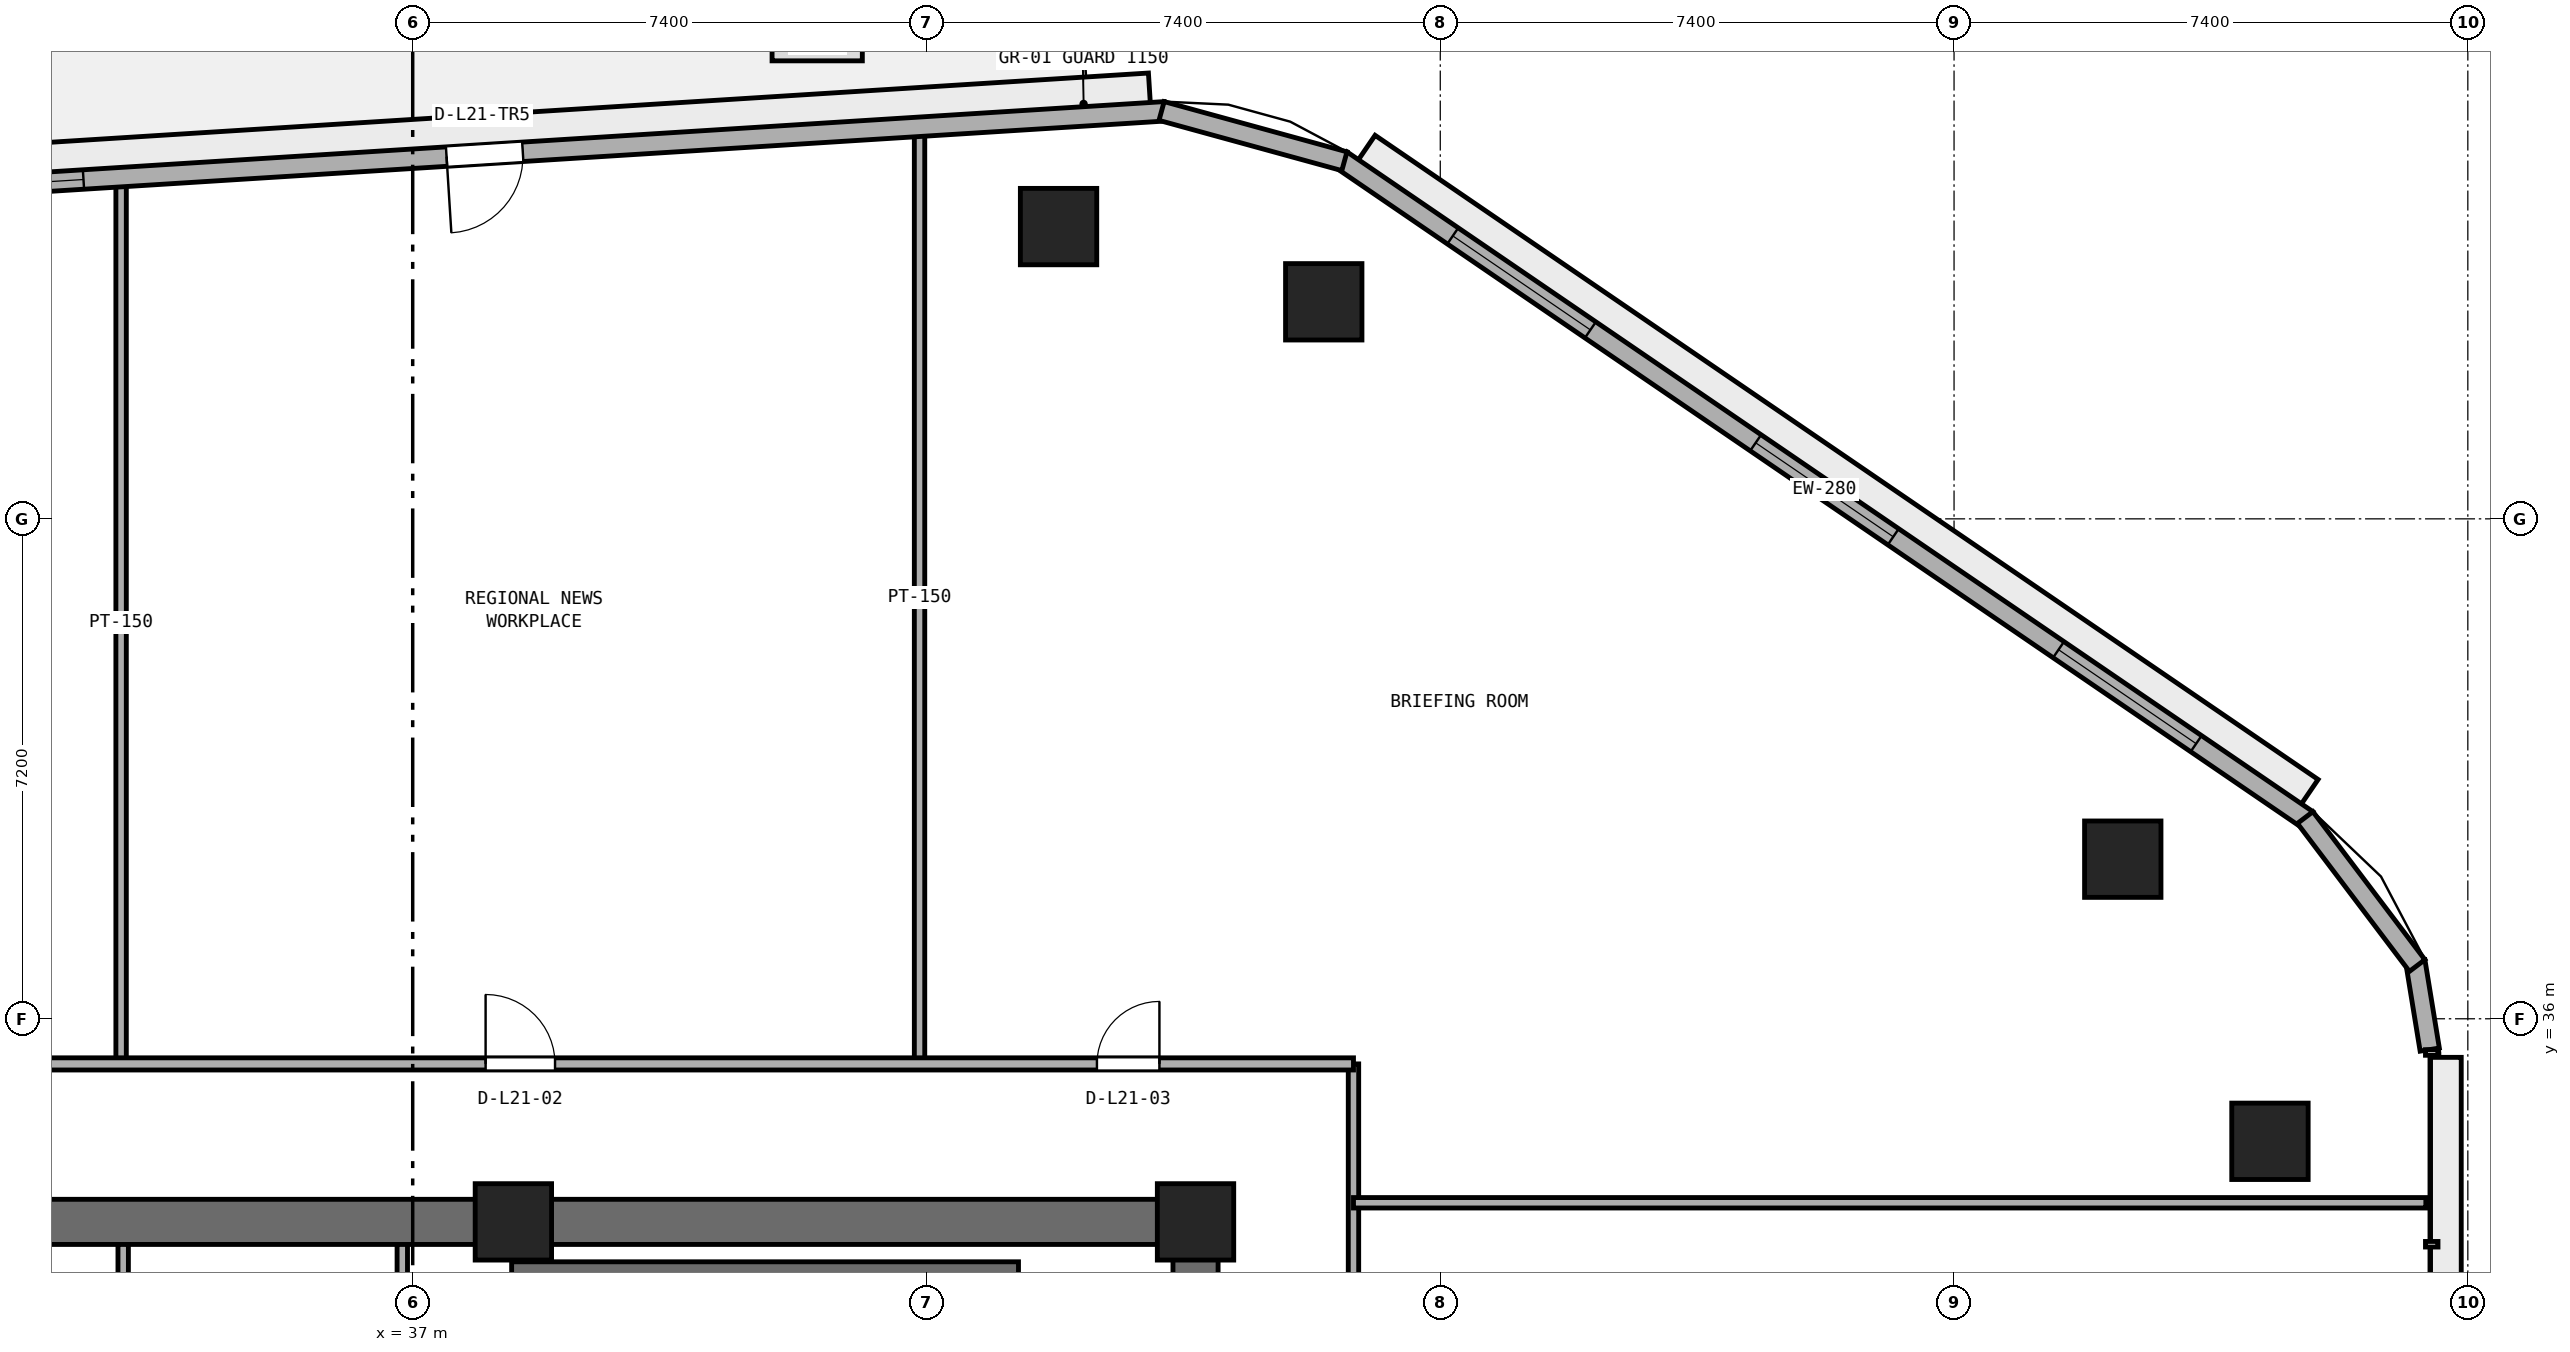
"""IFC4 building model, lengths in metres.
Left out: names, types, materials, properties, quantities, classifications, styles, units other than length and angle.
Written with IfcOpenShell. Run it as: python <this file> out.ifc"""

import sys

from ifc_helpers import new_model, si_unit, direction, frame, frame_2d, origin, origin_2d, place, context, subcontext, project, spatial, rectangle, extrude, element, fill, save


model = new_model("IFC4")
c1 = context("Model", 3, precision=1e-05, world=origin(), true_north=direction((0.0, 1.0)))
c2 = subcontext(c1, "Body", "Model", "MODEL_VIEW")
j1 = project(units=[si_unit("LENGTHUNIT", "METRE"), si_unit("PLANEANGLEUNIT", "RADIAN")], contexts=[c1])
p1 = place(None, origin())
s1 = spatial("IfcSite", under=j1, at=p1, CompositionType="ELEMENT")
p2 = place(p1, origin())
s2 = spatial("IfcBuilding", under=s1, at=p2, CompositionType="ELEMENT")
p3 = place(p2, frame((0.0, 0.0, 85.8)))
s3 = spatial("IfcBuildingStorey", under=s2, at=p3, CompositionType="ELEMENT", Elevation=85.8)
p4 = place(p3, frame((25.4, 33.075, 0.0), z_axis=(0.0, 0.0, 1.0), x_axis=(1.0, 0.0, 0.0)))
e1 = element("IfcWall", 1, at=p4, inside=s3, PredefinedType="SHEAR", context=c2, shape_type="SweptSolid", body=[
    extrude(rectangle(XDim=23.2, YDim=0.65, at=frame_2d((11.6, 0.0))), origin(), (0.0, 0.0, 1.0), 3.525),
])
p5 = place(p3, frame((48.275, 17.65, 0.0), z_axis=(0.0, 0.0, 1.0), x_axis=(0.0, 1.0, 0.0)))
e2 = element("IfcWall", 2, at=p5, inside=s3, PredefinedType="SHEAR", context=c2, shape_type="SweptSolid", body=[
    extrude(rectangle(XDim=15.1, YDim=0.65, at=frame_2d((7.55, 0.0))), origin(), (0.0, 0.0, 1.0), 3.525),
])
p6 = place(p5, frame((5.65, 0.0, 0.0)))
e3 = element("IfcOpeningElement", 3, at=p6, cuts=e2, PredefinedType="OPENING", context=c2, shape_type="SweptSolid", body=[
    extrude(rectangle(XDim=1.5, YDim=2.15, at=frame_2d((0.75, 1.075))), frame((0.0, 0.335, 0.0), z_axis=(0.0, -1.0, 0.0), x_axis=(1.0, 0.0, 0.0)), (0.0, 0.0, 1.0), 0.67),
])
for number, where, z_axis, x_axis in (
    (4, (48.275, 33.075, 0.0), (0.0, 0.0, 1.0), (1.0, 0.0, 0.0)),
    (5, (38.45, 33.075, 0.0), (0.0, 0.0, 1.0), (1.0, 0.0, 0.0)),
):
    element("IfcColumn", number, at=place(p3, frame(where, z_axis=z_axis, x_axis=x_axis)), inside=s3, PredefinedType="PILASTER", context=c2, shape_type="SweptSolid", body=[
        extrude(rectangle(XDim=1.1, YDim=1.1, at=origin_2d()), origin(), (0.0, 0.0, 1.0), 3.8),
    ])
for number, where, z_axis, x_axis in (
    (6, (63.75, 34.235, 0.0), (0.0, 0.0, 1.0), (1.0, 0.0, 0.0)),
    (7, (61.63, 38.299, 0.0), (0.0, 0.0, 1.0), (1.0, 0.0, 0.0)),
    (8, (50.122, 46.326, 0.0), (0.0, 0.0, 1.0), (1.0, 0.0, 0.0)),
    (9, (46.302, 47.409, 0.0), (0.0, 0.0, 1.0), (1.0, 0.0, 0.0)),
):
    element("IfcColumn", number, at=place(p3, frame(where, z_axis=z_axis, x_axis=x_axis)), inside=s3, PredefinedType="COLUMN", context=c2, shape_type="SweptSolid", body=[
        extrude(rectangle(XDim=1.1, YDim=1.1, at=origin_2d()), origin(), (0.0, 0.0, 1.0), 3.8),
    ])
p7 = place(p3, frame((38.425, 32.375, 0.0), z_axis=(0.0, 0.0, 1.0), x_axis=(1.0, 0.0, 0.0)))
e10 = element("IfcWall", 10, at=p7, inside=s3, PredefinedType="SHEAR", context=c2, shape_type="SweptSolid", body=[
    extrude(rectangle(XDim=7.3, YDim=0.25, at=frame_2d((3.65, 0.0))), origin(), (0.0, 0.0, 1.0), 3.525),
])
for number, where, z_axis, x_axis in (
    (11, (32.83, 30.65, 0.0), (0.0, 0.0, 1.0), (0.0, 1.0, 0.0)),
    (12, (36.85, 30.65, 0.0), (0.0, 0.0, 1.0), (0.0, 1.0, 0.0)),
):
    element("IfcWall", number, at=place(p3, frame(where, z_axis=z_axis, x_axis=x_axis)), inside=s3, PredefinedType="PARTITIONING", context=c2, shape_type="SweptSolid", body=[
        extrude(rectangle(XDim=2.1, YDim=0.15, at=frame_2d((1.05, 0.0))), origin(), (0.0, 0.0, 1.0), 3.525),
    ])
p8 = place(p3, frame((50.55, 15.05, 0.0), z_axis=(0.0, 0.0, 1.0), x_axis=(0.0, 1.0, 0.0)))
e13 = element("IfcWall", 13, at=p8, inside=s3, PredefinedType="PARTITIONING", context=c2, shape_type="SweptSolid", body=[
    extrude(rectangle(XDim=20.3, YDim=0.15, at=frame_2d((10.15, 0.0))), origin(), (0.0, 0.0, 1.0), 3.525),
])
p9 = place(p8, frame((9.7, 0.0, 0.0)))
e14 = element("IfcOpeningElement", 14, at=p9, cuts=e13, PredefinedType="OPENING", context=c2, shape_type="SweptSolid", body=[
    extrude(rectangle(XDim=0.9, YDim=2.1, at=frame_2d((0.45, 1.05))), frame((0.0, 0.085, 0.0), z_axis=(0.0, -1.0, 0.0), x_axis=(1.0, 0.0, 0.0)), (0.0, 0.0, 1.0), 0.17),
])
p10 = place(p3, frame((44.3, 35.35, 0.0), z_axis=(0.0, 0.0, 1.0), x_axis=(0.0, 1.0, 0.0)))
e15 = element("IfcWall", 15, at=p10, inside=s3, PredefinedType="PARTITIONING", context=c2, shape_type="SweptSolid", body=[
    extrude(rectangle(XDim=13.432, YDim=0.15, at=frame_2d((6.716, 0.0))), origin(), (0.0, 0.0, 1.0), 3.525),
])
p11 = place(p3, frame((32.8, 35.35, 0.0), z_axis=(0.0, 0.0, 1.0), x_axis=(0.0, 1.0, 0.0)))
e16 = element("IfcWall", 16, at=p11, inside=s3, PredefinedType="PARTITIONING", context=c2, shape_type="SweptSolid", body=[
    extrude(rectangle(XDim=12.707, YDim=0.15, at=frame_2d((6.353, 0.0))), origin(), (0.0, 0.0, 1.0), 3.525),
])
p12 = place(p3, frame((50.55, 33.35, 0.0), z_axis=(0.0, 0.0, 1.0), x_axis=(1.0, 0.0, 0.0)))
e17 = element("IfcWall", 17, at=p12, inside=s3, PredefinedType="PARTITIONING", context=c2, shape_type="SweptSolid", body=[
    extrude(rectangle(XDim=15.445, YDim=0.15, at=frame_2d((7.723, 0.0))), origin(), (0.0, 0.0, 1.0), 2.908),
])
p13 = place(p3, frame((23.45, 35.35, 0.0), z_axis=(0.0, 0.0, 1.0), x_axis=(1.0, 0.0, 0.0)))
e18 = element("IfcWall", 18, at=p13, inside=s3, PredefinedType="PARTITIONING", context=c2, shape_type="SweptSolid", body=[
    extrude(rectangle(XDim=27.1, YDim=0.175, at=frame_2d((13.55, 0.0))), origin(), (0.0, 0.0, 1.0), 3.525),
])
p14 = place(p13, frame((4.295, 0.0, 0.0)))
e19 = element("IfcOpeningElement", 19, at=p14, cuts=e18, PredefinedType="OPENING", context=c2, shape_type="SweptSolid", body=[
    extrude(rectangle(XDim=1.0, YDim=2.12, at=frame_2d((0.5, 1.06))), frame((0.0, 0.097, 0.0), z_axis=(0.0, -1.0, 0.0), x_axis=(1.0, 0.0, 0.0)), (0.0, 0.0, 1.0), 0.195),
])
p15 = place(p13, frame((14.6, 0.0, 0.0)))
e20 = element("IfcOpeningElement", 20, at=p15, cuts=e18, PredefinedType="OPENING", context=c2, shape_type="SweptSolid", body=[
    extrude(rectangle(XDim=1.0, YDim=2.12, at=frame_2d((0.5, 1.06))), frame((0.0, 0.097, 0.0), z_axis=(0.0, -1.0, 0.0), x_axis=(1.0, 0.0, 0.0)), (0.0, 0.0, 1.0), 0.195),
])
p16 = place(p13, frame((23.405, 0.0, 0.0)))
e21 = element("IfcOpeningElement", 21, at=p16, cuts=e18, PredefinedType="OPENING", context=c2, shape_type="SweptSolid", body=[
    extrude(rectangle(XDim=0.9, YDim=2.1, at=frame_2d((0.45, 1.05))), frame((0.0, 0.097, 0.0), z_axis=(0.0, -1.0, 0.0), x_axis=(1.0, 0.0, 0.0)), (0.0, 0.0, 1.0), 0.195),
])
p17 = place(p3, frame((64.29, 38.867, 0.0), z_axis=(0.0, 0.0, 1.0), x_axis=(-0.825755550159, 0.564028165416, 0.0)))
e22 = element("IfcWall", 22, at=p17, inside=s3, PredefinedType="STANDARD", context=c2, shape_type="SweptSolid", body=[
    extrude(rectangle(XDim=16.848, YDim=0.28, at=frame_2d((8.424, 0.0))), origin(), (0.0, 0.0, 1.0), 3.525),
])
p18 = place(p17, frame((1.941, 0.0, 0.9)))
e23 = element("IfcOpeningElement", 23, at=p18, cuts=e22, PredefinedType="OPENING", context=c2, shape_type="SweptSolid", body=[
    extrude(rectangle(XDim=2.4, YDim=1.75, at=frame_2d((1.2, 0.875))), frame((0.0, 0.15, 0.0), z_axis=(0.0, -1.0, 0.0), x_axis=(1.0, 0.0, 0.0)), (0.0, 0.0, 1.0), 0.3),
])
p19 = place(p17, frame((7.224, 0.0, 0.9)))
e24 = element("IfcOpeningElement", 24, at=p19, cuts=e22, PredefinedType="OPENING", context=c2, shape_type="SweptSolid", body=[
    extrude(rectangle(XDim=2.4, YDim=1.75, at=frame_2d((1.2, 0.875))), frame((0.0, 0.15, 0.0), z_axis=(0.0, -1.0, 0.0), x_axis=(1.0, 0.0, 0.0)), (0.0, 0.0, 1.0), 0.3),
])
p20 = place(p17, frame((12.507, 0.0, 0.9)))
e25 = element("IfcOpeningElement", 25, at=p20, cuts=e22, PredefinedType="OPENING", context=c2, shape_type="SweptSolid", body=[
    extrude(rectangle(XDim=2.4, YDim=1.75, at=frame_2d((1.2, 0.875))), frame((0.0, 0.15, 0.0), z_axis=(0.0, -1.0, 0.0), x_axis=(1.0, 0.0, 0.0)), (0.0, 0.0, 1.0), 0.3),
])
p21 = place(p3, frame((47.832, 49.069, 0.0), z_axis=(0.0, 0.0, 1.0), x_axis=(-0.998017725054, -0.062933460723, 0.0)))
e26 = element("IfcWall", 26, at=p21, inside=s3, PredefinedType="STANDARD", context=c2, shape_type="SweptSolid", body=[
    extrude(rectangle(XDim=19.629, YDim=0.28, at=frame_2d((9.815, 0.0))), origin(), (0.0, 0.0, 1.0), 3.525),
])
p22 = place(p21, frame((9.265, 0.0, 0.0)))
e27 = element("IfcOpeningElement", 27, at=p22, cuts=e26, PredefinedType="OPENING", context=c2, shape_type="SweptSolid", body=[
    extrude(rectangle(XDim=1.1, YDim=2.2, at=frame_2d((0.55, 1.1))), frame((0.0, 0.15, 0.0), z_axis=(0.0, -1.0, 0.0), x_axis=(1.0, 0.0, 0.0)), (0.0, 0.0, 1.0), 0.3),
])
p23 = place(p21, frame((15.604, 0.0, 0.9)))
e28 = element("IfcOpeningElement", 28, at=p23, cuts=e26, PredefinedType="OPENING", context=c2, shape_type="SweptSolid", body=[
    extrude(rectangle(XDim=2.4, YDim=1.75, at=frame_2d((1.2, 0.875))), frame((0.0, 0.15, 0.0), z_axis=(0.0, -1.0, 0.0), x_axis=(1.0, 0.0, 0.0)), (0.0, 0.0, 1.0), 0.3),
])
p24 = place(p3, frame((66.052, 35.556, 0.0), z_axis=(0.0, 0.0, 1.0), x_axis=(-0.161357776207, 0.98689597631, 0.0)))
e29 = element("IfcWall", 29, at=p24, inside=s3, PredefinedType="STANDARD", context=c2, shape_type="SweptSolid", body=[
    extrude(rectangle(XDim=1.289, YDim=0.28, at=frame_2d((0.645, 0.0))), origin(), (0.0, 0.0, 1.0), 3.525),
])
p25 = place(p3, frame((65.87, 36.767, 0.0), z_axis=(0.0, 0.0, 1.0), x_axis=(-0.603370463754, 0.797461023166, 0.0)))
e30 = element("IfcWall", 30, at=p25, inside=s3, PredefinedType="STANDARD", context=c2, shape_type="SweptSolid", body=[
    extrude(rectangle(XDim=2.673, YDim=0.28, at=frame_2d((1.336, 0.0))), origin(), (0.0, 0.0, 1.0), 3.525),
])
p26 = place(p3, frame((50.419, 48.351, 0.0), z_axis=(0.0, 0.0, 1.0), x_axis=(-0.964254516967, 0.264977784933, 0.0)))
e31 = element("IfcWall", 31, at=p26, inside=s3, PredefinedType="STANDARD", context=c2, shape_type="SweptSolid", body=[
    extrude(rectangle(XDim=2.731, YDim=0.28, at=frame_2d((1.365, 0.0))), origin(), (0.0, 0.0, 1.0), 3.525),
])
p27 = place(p15, origin())
e32 = element("IfcDoor", 32, at=p27, inside=s3, OperationType="SINGLE_SWING_LEFT", PredefinedType="DOOR", context=c2, shape_type="SweptSolid", body=[
    extrude(rectangle(XDim=1.0, YDim=2.12, at=frame_2d((0.5, 1.06))), frame((0.0, 0.025, 0.0), z_axis=(0.0, -1.0, 0.0), x_axis=(1.0, 0.0, 0.0)), (0.0, 0.0, 1.0), 0.05),
])
fill(e20, e32)
p28 = place(p16, origin())
e33 = element("IfcDoor", 33, at=p28, inside=s3, OperationType="SINGLE_SWING_RIGHT", PredefinedType="DOOR", context=c2, shape_type="SweptSolid", body=[
    extrude(rectangle(XDim=0.9, YDim=2.1, at=frame_2d((0.45, 1.05))), frame((0.0, 0.025, 0.0), z_axis=(0.0, -1.0, 0.0), x_axis=(1.0, 0.0, 0.0)), (0.0, 0.0, 1.0), 0.05),
])
fill(e21, e33)
p29 = place(p18, origin())
e34 = element("IfcWindow", 34, at=p29, inside=s3, PartitioningType="SINGLE_PANEL", PredefinedType="WINDOW", context=c2, shape_type="SweptSolid", body=[
    extrude(rectangle(XDim=2.4, YDim=1.75, at=frame_2d((1.2, 0.875))), frame((0.0, 0.03, 0.0), z_axis=(0.0, -1.0, 0.0), x_axis=(1.0, 0.0, 0.0)), (0.0, 0.0, 1.0), 0.06),
])
fill(e23, e34)
p30 = place(p19, origin())
e35 = element("IfcWindow", 35, at=p30, inside=s3, PartitioningType="SINGLE_PANEL", PredefinedType="WINDOW", context=c2, shape_type="SweptSolid", body=[
    extrude(rectangle(XDim=2.4, YDim=1.75, at=frame_2d((1.2, 0.875))), frame((0.0, 0.03, 0.0), z_axis=(0.0, -1.0, 0.0), x_axis=(1.0, 0.0, 0.0)), (0.0, 0.0, 1.0), 0.06),
])
fill(e24, e35)
p31 = place(p20, origin())
e36 = element("IfcWindow", 36, at=p31, inside=s3, PartitioningType="SINGLE_PANEL", PredefinedType="WINDOW", context=c2, shape_type="SweptSolid", body=[
    extrude(rectangle(XDim=2.4, YDim=1.75, at=frame_2d((1.2, 0.875))), frame((0.0, 0.03, 0.0), z_axis=(0.0, -1.0, 0.0), x_axis=(1.0, 0.0, 0.0)), (0.0, 0.0, 1.0), 0.06),
])
fill(e25, e36)
p32 = place(p22, origin())
e37 = element("IfcDoor", 37, at=p32, inside=s3, OperationType="SINGLE_SWING_RIGHT", PredefinedType="DOOR", context=c2, shape_type="SweptSolid", body=[
    extrude(rectangle(XDim=1.1, YDim=2.2, at=frame_2d((0.55, 1.1))), frame((0.0, 0.025, 0.0), z_axis=(0.0, -1.0, 0.0), x_axis=(1.0, 0.0, 0.0)), (0.0, 0.0, 1.0), 0.05),
])
fill(e27, e37)
p33 = place(p23, origin())
e38 = element("IfcWindow", 38, at=p33, inside=s3, PartitioningType="SINGLE_PANEL", PredefinedType="WINDOW", context=c2, shape_type="SweptSolid", body=[
    extrude(rectangle(XDim=2.4, YDim=1.75, at=frame_2d((1.2, 0.875))), frame((0.0, 0.03, 0.0), z_axis=(0.0, -1.0, 0.0), x_axis=(1.0, 0.0, 0.0)), (0.0, 0.0, 1.0), 0.06),
])
fill(e28, e38)
save(model, sys.argv[1])
